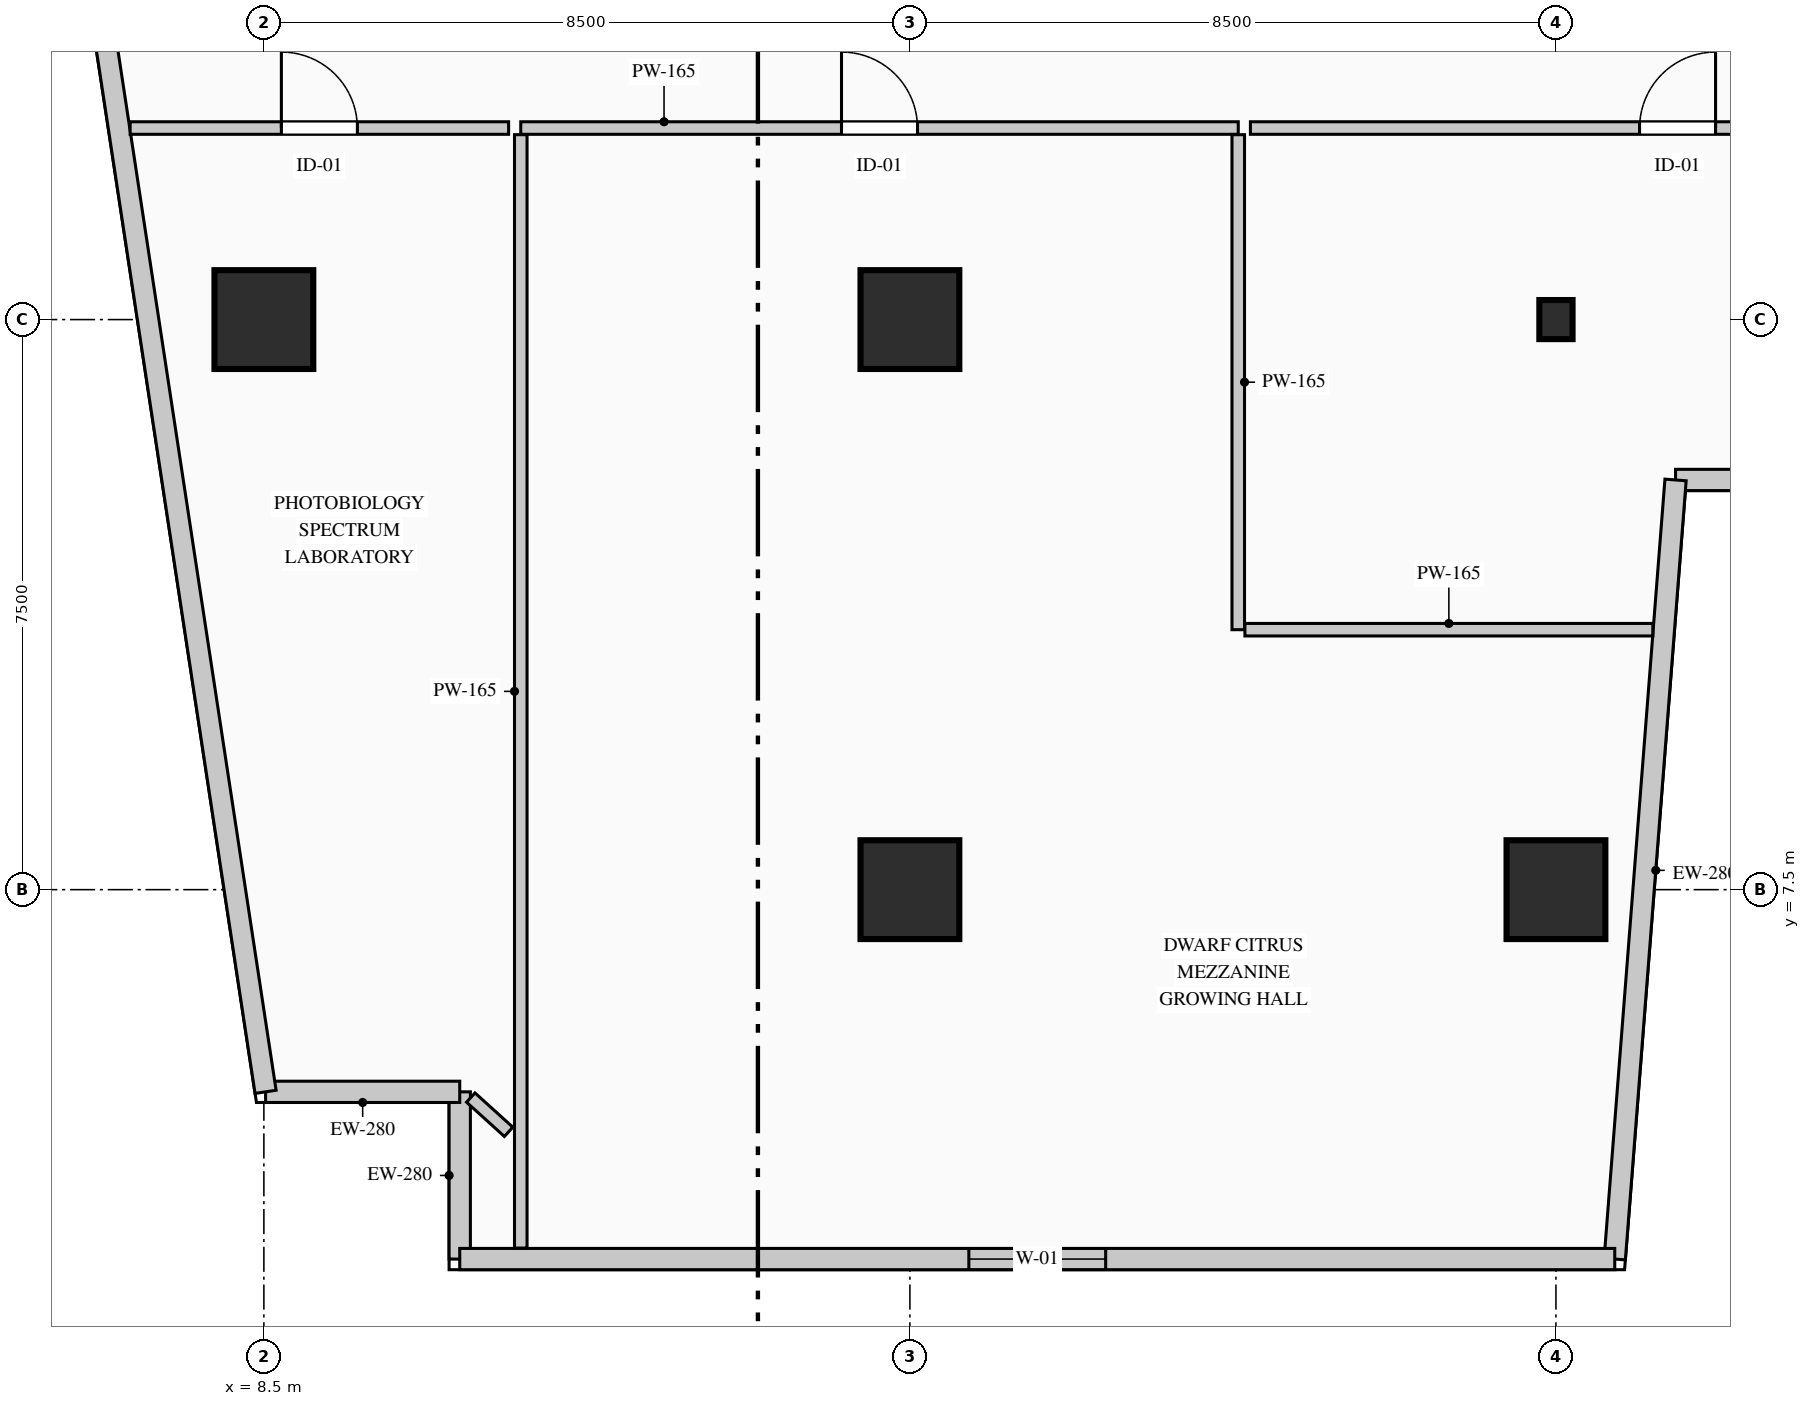
"""IFC4 building model, lengths in metres.
Left out: names, types, materials, properties, quantities, classifications, styles, units other than length and angle.
Written with IfcOpenShell. Run it as: python <this file> out.ifc"""

import sys

from ifc_helpers import new_model, si_unit, direction, frame, frame_2d, origin, origin_2d, place, context, subcontext, project, spatial, rectangle, i_section, extrude, element, fill, save


model = new_model("IFC4")
c1 = context("Model", 3, precision=1e-05, world=origin(), true_north=direction((0.0, 1.0)))
c2 = subcontext(c1, "Body", "Model", "MODEL_VIEW")
j1 = project(units=[si_unit("LENGTHUNIT", "METRE"), si_unit("PLANEANGLEUNIT", "RADIAN")], contexts=[c1])
p1 = place(None, origin())
s1 = spatial("IfcSite", under=j1, at=p1, CompositionType="ELEMENT")
p2 = place(p1, origin())
s2 = spatial("IfcBuilding", under=s1, at=p2, CompositionType="ELEMENT")
p3 = place(p2, frame((0.0, 0.0, 75.4)))
s3 = spatial("IfcBuildingStorey", under=s2, at=p3, CompositionType="ELEMENT", Elevation=75.4)
for number, where, z_axis, x_axis in (
    (1, (8.5, 15.0, 0.0), (0.0, 0.0, 1.0), (1.0, 0.0, 0.0)),
    (2, (17.0, 7.5, 0.0), (0.0, 0.0, 1.0), (1.0, 0.0, 0.0)),
    (3, (17.0, 15.0, 0.0), (0.0, 0.0, 1.0), (1.0, 0.0, 0.0)),
    (4, (25.5, 7.5, 0.0), (0.0, 0.0, 1.0), (1.0, 0.0, 0.0)),
):
    element("IfcColumn", number, at=place(p3, frame(where, z_axis=z_axis, x_axis=x_axis)), inside=s3, PredefinedType="COLUMN", context=c2, shape_type="SweptSolid", body=[
        extrude(rectangle(XDim=1.3, YDim=1.3, at=origin_2d()), origin(), (0.0, 0.0, 1.0), 4.4),
    ])
p4 = place(p3, frame((25.5, 15.0, 0.0), z_axis=(0.0, 0.0, 1.0), x_axis=(1.0, 0.0, 0.0)))
e5 = element("IfcColumn", 5, at=p4, inside=s3, PredefinedType="COLUMN", context=c2, shape_type="SweptSolid", body=[
    extrude(i_section(OverallWidth=0.437, OverallDepth=0.514, WebThickness=0.061, FlangeThickness=0.077, FilletRadius=0.015, at=origin_2d()), origin(), (0.0, 0.0, 1.0), 4.4),
])
p5 = place(p3, frame((11.077, 2.64, 0.0), z_axis=(0.0, 0.0, 1.0), x_axis=(0.0, 1.0, 0.0)))
e6 = element("IfcWall", 6, at=p5, inside=s3, PredefinedType="STANDARD", context=c2, shape_type="SweptSolid", body=[
    extrude(rectangle(XDim=2.2, YDim=0.28, at=frame_2d((1.1, 0.0))), origin(), (0.0, 0.0, 1.0), 4.115),
])
p6 = place(p3, frame((11.077, 4.84, 0.0), z_axis=(0.0, 0.0, 1.0), x_axis=(-1.0, 0.0, 0.0)))
e7 = element("IfcWall", 7, at=p6, inside=s3, PredefinedType="STANDARD", context=c2, shape_type="SweptSolid", body=[
    extrude(rectangle(XDim=2.554, YDim=0.28, at=frame_2d((1.277, 0.0))), origin(), (0.0, 0.0, 1.0), 4.115),
])
p7 = place(p3, frame((8.523, 4.84, 0.0), z_axis=(0.0, 0.0, 1.0), x_axis=(-0.150394554312, 0.988626055712, 0.0)))
e8 = element("IfcWall", 8, at=p7, inside=s3, PredefinedType="STANDARD", context=c2, shape_type="SweptSolid", body=[
    extrude(rectangle(XDim=36.738, YDim=0.28, at=frame_2d((18.369, 0.0))), origin(), (0.0, 0.0, 1.0), 4.115),
])
p8 = place(p7, frame((22.612, 0.0, 0.9)))
e9 = element("IfcOpeningElement", 9, at=p8, cuts=e8, PredefinedType="OPENING", context=c2, shape_type="SweptSolid", body=[
    extrude(rectangle(XDim=1.8, YDim=2.1, at=frame_2d((0.9, 1.05))), frame((0.0, 0.15, 0.0), z_axis=(0.0, -1.0, 0.0), x_axis=(1.0, 0.0, 0.0)), (0.0, 0.0, 1.0), 0.3),
])
p9 = place(p3, frame((35.77, 12.89, 0.0), z_axis=(0.0, 0.0, 1.0), x_axis=(-1.0, 0.0, 0.0)))
e10 = element("IfcWall", 10, at=p9, inside=s3, PredefinedType="STANDARD", context=c2, shape_type="SweptSolid", body=[
    extrude(rectangle(XDim=8.697, YDim=0.28, at=frame_2d((4.348, 0.0))), origin(), (0.0, 0.0, 1.0), 4.115),
])
p10 = place(p9, frame((4.666, 0.0, 0.9)))
e11 = element("IfcOpeningElement", 11, at=p10, cuts=e10, PredefinedType="OPENING", context=c2, shape_type="SweptSolid", body=[
    extrude(rectangle(XDim=1.8, YDim=2.1, at=frame_2d((0.9, 1.05))), frame((0.0, 0.15, 0.0), z_axis=(0.0, -1.0, 0.0), x_axis=(1.0, 0.0, 0.0)), (0.0, 0.0, 1.0), 0.3),
])
p11 = place(p3, frame((27.073, 12.89, 0.0), z_axis=(0.0, 0.0, 1.0), x_axis=(-0.077816860153, -0.996967670627, 0.0)))
e12 = element("IfcWall", 12, at=p11, inside=s3, PredefinedType="STANDARD", context=c2, shape_type="SweptSolid", body=[
    extrude(rectangle(XDim=10.281, YDim=0.28, at=frame_2d((5.141, 0.0))), origin(), (0.0, 0.0, 1.0), 4.115),
])
p12 = place(p3, frame((26.273, 2.64, 0.0), z_axis=(0.0, 0.0, 1.0), x_axis=(-1.0, 0.0, 0.0)))
e13 = element("IfcWall", 13, at=p12, inside=s3, PredefinedType="STANDARD", context=c2, shape_type="SweptSolid", body=[
    extrude(rectangle(XDim=15.197, YDim=0.28, at=frame_2d((7.598, 0.0))), origin(), (0.0, 0.0, 1.0), 4.115),
])
p13 = place(p12, frame((6.698, 0.0, 0.9)))
e14 = element("IfcOpeningElement", 14, at=p13, cuts=e13, PredefinedType="OPENING", context=c2, shape_type="SweptSolid", body=[
    extrude(rectangle(XDim=1.8, YDim=2.1, at=frame_2d((0.9, 1.05))), frame((0.0, 0.15, 0.0), z_axis=(0.0, -1.0, 0.0), x_axis=(1.0, 0.0, 0.0)), (0.0, 0.0, 1.0), 0.3),
])
p14 = place(p3, frame((11.88, 17.52, 0.0), z_axis=(0.0, 0.0, 1.0), x_axis=(1.0, 0.0, 0.0)))
e15 = element("IfcWall", 15, at=p14, inside=s3, PredefinedType="PARTITIONING", context=c2, shape_type="SweptSolid", body=[
    extrude(rectangle(XDim=9.44, YDim=0.165, at=frame_2d((4.72, 0.0))), origin(), (0.0, 0.0, 1.0), 4.115),
])
p15 = place(p14, frame((4.22, 0.0, 0.0)))
e16 = element("IfcOpeningElement", 16, at=p15, cuts=e15, PredefinedType="OPENING", context=c2, shape_type="SweptSolid", body=[
    extrude(rectangle(XDim=1.0, YDim=2.15, at=frame_2d((0.5, 1.075))), frame((0.0, 0.093, 0.0), z_axis=(0.0, -1.0, 0.0), x_axis=(1.0, 0.0, 0.0)), (0.0, 0.0, 1.0), 0.185),
])
p16 = place(p3, frame((21.32, 17.433, 0.0), z_axis=(0.0, 0.0, 1.0), x_axis=(0.0, -1.0, 0.0)))
e17 = element("IfcWall", 17, at=p16, inside=s3, PredefinedType="PARTITIONING", context=c2, shape_type="SweptSolid", body=[
    extrude(rectangle(XDim=6.513, YDim=0.165, at=frame_2d((3.256, 0.0))), origin(), (0.0, 0.0, 1.0), 3.74),
])
p17 = place(p3, frame((21.407, 10.92, 0.0), z_axis=(0.0, 0.0, 1.0), x_axis=(1.0, 0.0, 0.0)))
e18 = element("IfcWall", 18, at=p17, inside=s3, PredefinedType="PARTITIONING", context=c2, shape_type="SweptSolid", body=[
    extrude(rectangle(XDim=5.367, YDim=0.165, at=frame_2d((2.684, 0.0))), origin(), (0.0, 0.0, 1.0), 4.115),
])
p18 = place(p3, frame((11.88, 2.785, 0.0), z_axis=(0.0, 0.0, 1.0), x_axis=(0.0, 1.0, 0.0)))
e19 = element("IfcWall", 19, at=p18, inside=s3, PredefinedType="PARTITIONING", context=c2, shape_type="SweptSolid", body=[
    extrude(rectangle(XDim=14.648, YDim=0.165, at=frame_2d((7.324, 0.0))), origin(), (0.0, 0.0, 1.0), 4.115),
])
p19 = place(p3, frame((11.72, 4.314, 0.0), z_axis=(0.0, 0.0, 1.0), x_axis=(-0.741303295748, 0.671170189827, 0.0)))
e20 = element("IfcWall", 20, at=p19, inside=s3, PredefinedType="PARTITIONING", context=c2, shape_type="SweptSolid", body=[
    extrude(rectangle(XDim=0.672, YDim=0.165, at=frame_2d((0.336, 0.0))), origin(), (0.0, 0.0, 1.0), 4.115),
])
p20 = place(p3, frame((6.74, 17.52, 0.0), z_axis=(0.0, 0.0, 1.0), x_axis=(1.0, 0.0, 0.0)))
e21 = element("IfcWall", 21, at=p20, inside=s3, PredefinedType="PARTITIONING", context=c2, shape_type="SweptSolid", body=[
    extrude(rectangle(XDim=4.979, YDim=0.165, at=frame_2d((2.49, 0.0))), origin(), (0.0, 0.0, 1.0), 4.115),
])
p21 = place(p20, frame((1.99, 0.0, 0.0)))
e22 = element("IfcOpeningElement", 22, at=p21, cuts=e21, PredefinedType="OPENING", context=c2, shape_type="SweptSolid", body=[
    extrude(rectangle(XDim=1.0, YDim=2.15, at=frame_2d((0.5, 1.075))), frame((0.0, 0.093, 0.0), z_axis=(0.0, -1.0, 0.0), x_axis=(1.0, 0.0, 0.0)), (0.0, 0.0, 1.0), 0.185),
])
p22 = place(p3, frame((21.48, 17.52, 0.0), z_axis=(0.0, 0.0, 1.0), x_axis=(1.0, 0.0, 0.0)))
e23 = element("IfcWall", 23, at=p22, inside=s3, PredefinedType="PARTITIONING", context=c2, shape_type="SweptSolid", body=[
    extrude(rectangle(XDim=11.24, YDim=0.165, at=frame_2d((5.62, 0.0))), origin(), (0.0, 0.0, 1.0), 3.9),
])
p23 = place(p22, frame((5.12, 0.0, 0.0)))
e24 = element("IfcOpeningElement", 24, at=p23, cuts=e23, PredefinedType="OPENING", context=c2, shape_type="SweptSolid", body=[
    extrude(rectangle(XDim=1.0, YDim=2.15, at=frame_2d((0.5, 1.075))), frame((0.0, 0.093, 0.0), z_axis=(0.0, -1.0, 0.0), x_axis=(1.0, 0.0, 0.0)), (0.0, 0.0, 1.0), 0.185),
])
p24 = place(p13, origin())
e25 = element("IfcWindow", 25, at=p24, inside=s3, PartitioningType="SINGLE_PANEL", PredefinedType="WINDOW", context=c2, shape_type="SweptSolid", body=[
    extrude(rectangle(XDim=1.8, YDim=2.1, at=frame_2d((0.9, 1.05))), frame((0.0, 0.03, 0.0), z_axis=(0.0, -1.0, 0.0), x_axis=(1.0, 0.0, 0.0)), (0.0, 0.0, 1.0), 0.06),
])
fill(e14, e25)
p25 = place(p15, origin())
e26 = element("IfcDoor", 26, at=p25, inside=s3, OperationType="SINGLE_SWING_LEFT", PredefinedType="DOOR", context=c2, shape_type="SweptSolid", body=[
    extrude(rectangle(XDim=1.0, YDim=2.15, at=frame_2d((0.5, 1.075))), frame((0.0, 0.025, 0.0), z_axis=(0.0, -1.0, 0.0), x_axis=(1.0, 0.0, 0.0)), (0.0, 0.0, 1.0), 0.05),
])
fill(e16, e26)
p26 = place(p21, origin())
e27 = element("IfcDoor", 27, at=p26, inside=s3, OperationType="SINGLE_SWING_LEFT", PredefinedType="DOOR", context=c2, shape_type="SweptSolid", body=[
    extrude(rectangle(XDim=1.0, YDim=2.15, at=frame_2d((0.5, 1.075))), frame((0.0, 0.025, 0.0), z_axis=(0.0, -1.0, 0.0), x_axis=(1.0, 0.0, 0.0)), (0.0, 0.0, 1.0), 0.05),
])
fill(e22, e27)
p27 = place(p23, origin())
e28 = element("IfcDoor", 28, at=p27, inside=s3, OperationType="SINGLE_SWING_RIGHT", PredefinedType="DOOR", context=c2, shape_type="SweptSolid", body=[
    extrude(rectangle(XDim=1.0, YDim=2.15, at=frame_2d((0.5, 1.075))), frame((0.0, 0.025, 0.0), z_axis=(0.0, -1.0, 0.0), x_axis=(1.0, 0.0, 0.0)), (0.0, 0.0, 1.0), 0.05),
])
fill(e24, e28)
save(model, sys.argv[1])
